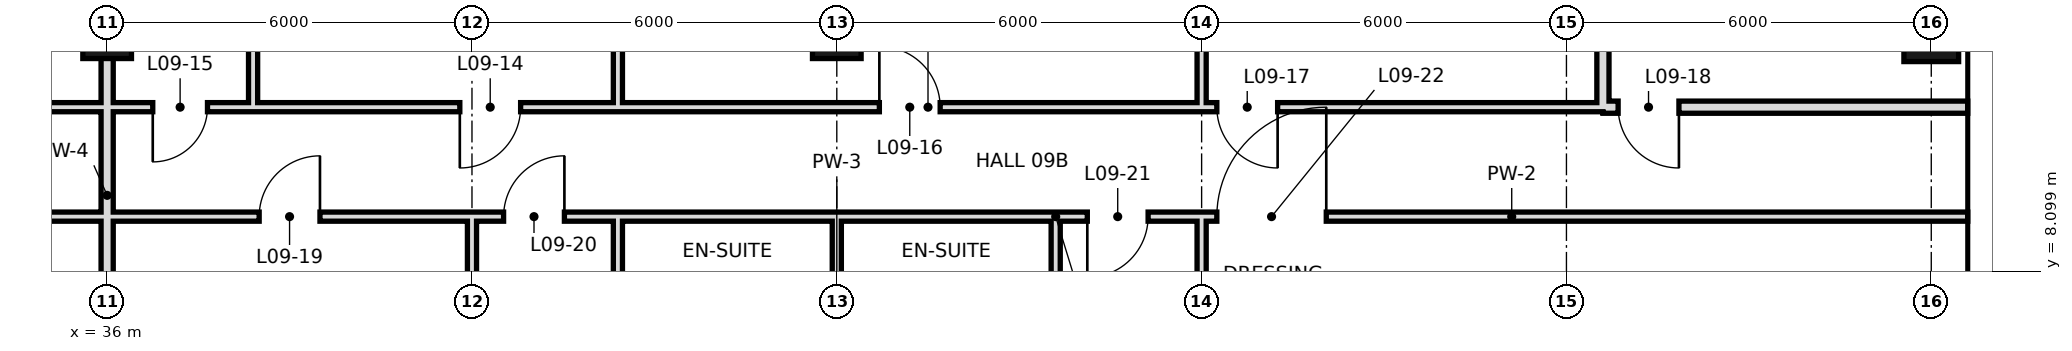
"""IFC4 building model, lengths in metres.
Left out: names, types, materials, properties, quantities, classifications, styles, units other than length and angle.
Written with IfcOpenShell. Run it as: python <this file> out.ifc"""

import sys

from ifc_helpers import new_model, si_unit, direction, frame, frame_2d, origin, origin_2d, place, context, subcontext, project, spatial, rectangle, hollow_rectangle, extrude, element, fill, save


model = new_model("IFC4")
c1 = context("Model", 3, precision=1e-05, world=origin(), true_north=direction((0.0, 1.0)))
c2 = subcontext(c1, "Body", "Model", "MODEL_VIEW")
j1 = project(units=[si_unit("LENGTHUNIT", "METRE"), si_unit("PLANEANGLEUNIT", "RADIAN")], contexts=[c1])
p1 = place(None, origin())
s1 = spatial("IfcSite", under=j1, at=p1, CompositionType="ELEMENT")
p2 = place(p1, origin())
s2 = spatial("IfcBuilding", under=s1, at=p2, CompositionType="ELEMENT")
p3 = place(p2, frame((0.0, 0.0, 53.4)))
s3 = spatial("IfcBuildingStorey", under=s2, at=p3, CompositionType="ELEMENT", Elevation=53.4)
for number, where, z_axis, x_axis in (
    (1, (36.0, 12.0, 0.0), (0.0, 0.0, 1.0), (1.0, 0.0, 0.0)),
    (2, (48.0, 12.0, 0.0), (0.0, 0.0, 1.0), (1.0, 0.0, 0.0)),
):
    element("IfcColumn", number, at=place(p3, frame(where, z_axis=z_axis, x_axis=x_axis)), inside=s3, PredefinedType="COLUMN", context=c2, shape_type="SweptSolid", body=[
        extrude(hollow_rectangle(XDim=0.8, YDim=0.8, WallThickness=0.04, at=origin_2d()), origin(), (0.0, 0.0, 1.0), 3.6),
    ])
p4 = place(p3, frame((66.0, 12.0, 0.0), z_axis=(0.0, 0.0, 1.0), x_axis=(1.0, 0.0, 0.0)))
e3 = element("IfcColumn", 3, at=p4, inside=s3, PredefinedType="COLUMN", context=c2, shape_type="SweptSolid", body=[
    extrude(hollow_rectangle(XDim=0.9, YDim=0.9, WallThickness=0.045, at=origin_2d()), origin(), (0.0, 0.0, 1.0), 3.6),
])
p5 = place(p3, frame((36.0, 0.0, 0.0), z_axis=(0.0, 0.0, 1.0), x_axis=(0.0, 1.0, 0.0)))
e4 = element("IfcWall", 4, at=p5, inside=s3, PredefinedType="SOLIDWALL", context=c2, shape_type="SweptSolid", body=[
    extrude(rectangle(XDim=18.7, YDim=0.2, at=frame_2d((9.35, 0.0))), origin(), (0.0, 0.0, 1.0), 2.72),
])
p6 = place(p3, frame((38.4, 10.8, 0.0), z_axis=(0.0, 0.0, 1.0), x_axis=(0.0, 1.0, 0.0)))
e5 = element("IfcWall", 5, at=p6, inside=s3, PredefinedType="PARTITIONING", context=c2, shape_type="SweptSolid", body=[
    extrude(rectangle(XDim=7.9, YDim=0.15, at=frame_2d((3.95, 0.0))), origin(), (0.0, 0.0, 1.0), 3.42),
])
p7 = place(p3, frame((42.0, -0.6, 0.0), z_axis=(0.0, 0.0, 1.0), x_axis=(0.0, 1.0, 0.0)))
e6 = element("IfcWall", 6, at=p7, inside=s3, PredefinedType="PARTITIONING", context=c2, shape_type="SweptSolid", body=[
    extrude(rectangle(XDim=9.6, YDim=0.15, at=frame_2d((4.8, 0.0))), origin(), (0.0, 0.0, 1.0), 2.72),
])
p8 = place(p3, frame((44.4, 10.8, 0.0), z_axis=(0.0, 0.0, 1.0), x_axis=(0.0, 1.0, 0.0)))
e7 = element("IfcWall", 7, at=p8, inside=s3, PredefinedType="PARTITIONING", context=c2, shape_type="SweptSolid", body=[
    extrude(rectangle(XDim=7.9, YDim=0.15, at=frame_2d((3.95, 0.0))), origin(), (0.0, 0.0, 1.0), 3.42),
])
p9 = place(p3, frame((44.4, 6.0, 0.0), z_axis=(0.0, 0.0, 1.0), x_axis=(0.0, 1.0, 0.0)))
e8 = element("IfcWall", 8, at=p9, inside=s3, PredefinedType="PARTITIONING", context=c2, shape_type="SweptSolid", body=[
    extrude(rectangle(XDim=3.0, YDim=0.15, at=frame_2d((1.5, 0.0))), origin(), (0.0, 0.0, 1.0), 3.42),
])
p10 = place(p3, frame((48.0, 6.0, 0.0), z_axis=(0.0, 0.0, 1.0), x_axis=(0.0, 1.0, 0.0)))
e9 = element("IfcWall", 9, at=p10, inside=s3, PredefinedType="PARTITIONING", context=c2, shape_type="SweptSolid", body=[
    extrude(rectangle(XDim=3.0, YDim=0.15, at=frame_2d((1.5, 0.0))), origin(), (0.0, 0.0, 1.0), 2.72),
])
p11 = place(p3, frame((51.6, 6.0, 0.0), z_axis=(0.0, 0.0, 1.0), x_axis=(0.0, 1.0, 0.0)))
e10 = element("IfcWall", 10, at=p11, inside=s3, PredefinedType="PARTITIONING", context=c2, shape_type="SweptSolid", body=[
    extrude(rectangle(XDim=3.0, YDim=0.15, at=frame_2d((1.5, 0.0))), origin(), (0.0, 0.0, 1.0), 3.42),
])
p12 = place(p3, frame((54.0, -0.6, 0.0), z_axis=(0.0, 0.0, 1.0), x_axis=(0.0, 1.0, 0.0)))
e11 = element("IfcWall", 11, at=p12, inside=s3, PredefinedType="PARTITIONING", context=c2, shape_type="SweptSolid", body=[
    extrude(rectangle(XDim=9.6, YDim=0.15, at=frame_2d((4.8, 0.0))), origin(), (0.0, 0.0, 1.0), 3.42),
])
p13 = place(p3, frame((54.0, 10.8, 0.0), z_axis=(0.0, 0.0, 1.0), x_axis=(0.0, 1.0, 0.0)))
e12 = element("IfcWall", 12, at=p13, inside=s3, PredefinedType="PARTITIONING", context=c2, shape_type="SweptSolid", body=[
    extrude(rectangle(XDim=7.2, YDim=0.15, at=frame_2d((3.6, 0.0))), origin(), (0.0, 0.0, 1.0), 3.42),
])
p14 = place(p3, frame((60.6, 10.8, 0.0), z_axis=(0.0, 0.0, 1.0), x_axis=(0.0, 1.0, 0.0)))
e13 = element("IfcWall", 13, at=p14, inside=s3, PredefinedType="SOLIDWALL", context=c2, shape_type="SweptSolid", body=[
    extrude(rectangle(XDim=7.2, YDim=0.2, at=frame_2d((3.6, 0.0))), origin(), (0.0, 0.0, 1.0), 2.52),
])
p15 = place(p3, frame((60.6, 10.8, 0.0), z_axis=(0.0, 0.0, 1.0), x_axis=(1.0, 0.0, 0.0)))
e14 = element("IfcWall", 14, at=p15, inside=s3, PredefinedType="SOLIDWALL", context=c2, shape_type="SweptSolid", body=[
    extrude(rectangle(XDim=6.0, YDim=0.2, at=frame_2d((3.0, 0.0))), origin(), (0.0, 0.0, 1.0), 2.97),
])
p16 = place(p15, frame((0.25, 0.0, 0.0)))
e15 = element("IfcOpeningElement", 15, at=p16, cuts=e14, PredefinedType="OPENING", context=c2, shape_type="SweptSolid", body=[
    extrude(rectangle(XDim=1.0, YDim=2.4, at=frame_2d((0.5, 1.2))), frame((0.0, 0.11, 0.0), z_axis=(0.0, -1.0, 0.0), x_axis=(1.0, 0.0, 0.0)), (0.0, 0.0, 1.0), 0.22),
])
p17 = place(p3, frame((6.6, 10.8, 0.0), z_axis=(0.0, 0.0, 1.0), x_axis=(1.0, 0.0, 0.0)))
e16 = element("IfcWall", 16, at=p17, inside=s3, PredefinedType="PARTITIONING", context=c2, shape_type="SweptSolid", body=[
    extrude(rectangle(XDim=29.4, YDim=0.15, at=frame_2d((14.7, 0.0))), origin(), (0.0, 0.0, 1.0), 3.42),
])
p18 = place(p17, frame((26.8, 0.0, 0.0)))
e17 = element("IfcOpeningElement", 17, at=p18, cuts=e16, PredefinedType="OPENING", context=c2, shape_type="SweptSolid", body=[
    extrude(rectangle(XDim=1.0, YDim=2.4, at=frame_2d((0.5, 1.2))), frame((0.0, 0.085, 0.0), z_axis=(0.0, -1.0, 0.0), x_axis=(1.0, 0.0, 0.0)), (0.0, 0.0, 1.0), 0.17),
])
p19 = place(p17, frame((3.22, 0.0, 0.0)))
e18 = element("IfcOpeningElement", 18, at=p19, cuts=e16, PredefinedType="OPENING", context=c2, shape_type="SweptSolid", body=[
    extrude(rectangle(XDim=1.0, YDim=2.4, at=frame_2d((0.5, 1.2))), frame((0.0, 0.085, 0.0), z_axis=(0.0, -1.0, 0.0), x_axis=(1.0, 0.0, 0.0)), (0.0, 0.0, 1.0), 0.17),
])
p20 = place(p17, frame((14.8, 0.0, 0.0)))
e19 = element("IfcOpeningElement", 19, at=p20, cuts=e16, PredefinedType="OPENING", context=c2, shape_type="SweptSolid", body=[
    extrude(rectangle(XDim=1.0, YDim=2.4, at=frame_2d((0.5, 1.2))), frame((0.0, 0.085, 0.0), z_axis=(0.0, -1.0, 0.0), x_axis=(1.0, 0.0, 0.0)), (0.0, 0.0, 1.0), 0.17),
])
p21 = place(p3, frame((38.4, 10.8, 0.0), z_axis=(0.0, 0.0, 1.0), x_axis=(1.0, 0.0, 0.0)))
e20 = element("IfcWall", 20, at=p21, inside=s3, PredefinedType="PARTITIONING", context=c2, shape_type="SweptSolid", body=[
    extrude(rectangle(XDim=22.2, YDim=0.15, at=frame_2d((11.1, 0.0))), origin(), (0.0, 0.0, 1.0), 3.42),
])
p22 = place(p21, frame((3.4, 0.0, 0.0)))
e21 = element("IfcOpeningElement", 21, at=p22, cuts=e20, PredefinedType="OPENING", context=c2, shape_type="SweptSolid", body=[
    extrude(rectangle(XDim=1.0, YDim=2.4, at=frame_2d((0.5, 1.2))), frame((0.0, 0.085, 0.0), z_axis=(0.0, -1.0, 0.0), x_axis=(1.0, 0.0, 0.0)), (0.0, 0.0, 1.0), 0.17),
])
p23 = place(p21, frame((10.3, 0.0, 0.0)))
e22 = element("IfcOpeningElement", 22, at=p23, cuts=e20, PredefinedType="OPENING", context=c2, shape_type="SweptSolid", body=[
    extrude(rectangle(XDim=1.0, YDim=2.4, at=frame_2d((0.5, 1.2))), frame((0.0, 0.085, 0.0), z_axis=(0.0, -1.0, 0.0), x_axis=(1.0, 0.0, 0.0)), (0.0, 0.0, 1.0), 0.17),
])
p24 = place(p21, frame((15.85, 0.0, 0.0)))
e23 = element("IfcOpeningElement", 23, at=p24, cuts=e20, PredefinedType="OPENING", context=c2, shape_type="SweptSolid", body=[
    extrude(rectangle(XDim=1.0, YDim=2.4, at=frame_2d((0.5, 1.2))), frame((0.0, 0.085, 0.0), z_axis=(0.0, -1.0, 0.0), x_axis=(1.0, 0.0, 0.0)), (0.0, 0.0, 1.0), 0.17),
])
p25 = place(p3, frame((36.0, 10.8, 0.0), z_axis=(0.0, 0.0, 1.0), x_axis=(1.0, 0.0, 0.0)))
e24 = element("IfcWall", 24, at=p25, inside=s3, PredefinedType="PARTITIONING", context=c2, shape_type="SweptSolid", body=[
    extrude(rectangle(XDim=2.4, YDim=0.15, at=frame_2d((1.2, 0.0))), origin(), (0.0, 0.0, 1.0), 3.42),
])
p26 = place(p25, frame((0.75, 0.0, 0.0)))
e25 = element("IfcOpeningElement", 25, at=p26, cuts=e24, PredefinedType="OPENING", context=c2, shape_type="SweptSolid", body=[
    extrude(rectangle(XDim=0.9, YDim=2.4, at=frame_2d((0.45, 1.2))), frame((0.0, 0.085, 0.0), z_axis=(0.0, -1.0, 0.0), x_axis=(1.0, 0.0, 0.0)), (0.0, 0.0, 1.0), 0.17),
])
p27 = place(p3, frame((8.4, 9.0, 0.0), z_axis=(0.0, 0.0, 1.0), x_axis=(1.0, 0.0, 0.0)))
e26 = element("IfcWall", 26, at=p27, inside=s3, PredefinedType="PARTITIONING", context=c2, shape_type="SweptSolid", body=[
    extrude(rectangle(XDim=36.0, YDim=0.15, at=frame_2d((18.0, 0.0))), origin(), (0.0, 0.0, 1.0), 3.42),
])
p28 = place(p27, frame((0.88, 0.0, 0.0)))
e27 = element("IfcOpeningElement", 27, at=p28, cuts=e26, PredefinedType="OPENING", context=c2, shape_type="SweptSolid", body=[
    extrude(rectangle(XDim=1.0, YDim=2.4, at=frame_2d((0.5, 1.2))), frame((0.0, 0.085, 0.0), z_axis=(0.0, -1.0, 0.0), x_axis=(1.0, 0.0, 0.0)), (0.0, 0.0, 1.0), 0.17),
])
p29 = place(p27, frame((6.1, 0.0, 0.0)))
e28 = element("IfcOpeningElement", 28, at=p29, cuts=e26, PredefinedType="OPENING", context=c2, shape_type="SweptSolid", body=[
    extrude(rectangle(XDim=1.0, YDim=2.4, at=frame_2d((0.5, 1.2))), frame((0.0, 0.085, 0.0), z_axis=(0.0, -1.0, 0.0), x_axis=(1.0, 0.0, 0.0)), (0.0, 0.0, 1.0), 0.17),
])
p30 = place(p27, frame((16.64, 0.0, 0.0)))
e29 = element("IfcOpeningElement", 29, at=p30, cuts=e26, PredefinedType="OPENING", context=c2, shape_type="SweptSolid", body=[
    extrude(rectangle(XDim=1.8, YDim=2.4, at=frame_2d((0.9, 1.2))), frame((0.0, 0.085, 0.0), z_axis=(0.0, -1.0, 0.0), x_axis=(1.0, 0.0, 0.0)), (0.0, 0.0, 1.0), 0.17),
])
p31 = place(p27, frame((23.7, 0.0, 0.0)))
e30 = element("IfcOpeningElement", 30, at=p31, cuts=e26, PredefinedType="OPENING", context=c2, shape_type="SweptSolid", body=[
    extrude(rectangle(XDim=1.8, YDim=2.4, at=frame_2d((0.9, 1.2))), frame((0.0, 0.085, 0.0), z_axis=(0.0, -1.0, 0.0), x_axis=(1.0, 0.0, 0.0)), (0.0, 0.0, 1.0), 0.17),
])
p32 = place(p27, frame((30.1, 0.0, 0.0)))
e31 = element("IfcOpeningElement", 31, at=p32, cuts=e26, PredefinedType="OPENING", context=c2, shape_type="SweptSolid", body=[
    extrude(rectangle(XDim=1.0, YDim=2.4, at=frame_2d((0.5, 1.2))), frame((0.0, 0.085, 0.0), z_axis=(0.0, -1.0, 0.0), x_axis=(1.0, 0.0, 0.0)), (0.0, 0.0, 1.0), 0.17),
])
p33 = place(p27, frame((34.12, 0.0, 0.0)))
e32 = element("IfcOpeningElement", 32, at=p33, cuts=e26, PredefinedType="OPENING", context=c2, shape_type="SweptSolid", body=[
    extrude(rectangle(XDim=1.0, YDim=2.4, at=frame_2d((0.5, 1.2))), frame((0.0, 0.085, 0.0), z_axis=(0.0, -1.0, 0.0), x_axis=(1.0, 0.0, 0.0)), (0.0, 0.0, 1.0), 0.17),
])
p34 = place(p3, frame((51.6, 9.0, 0.0), z_axis=(0.0, 0.0, 1.0), x_axis=(1.0, 0.0, 0.0)))
e33 = element("IfcWall", 33, at=p34, inside=s3, PredefinedType="PARTITIONING", context=c2, shape_type="SweptSolid", body=[
    extrude(rectangle(XDim=15.0, YDim=0.15, at=frame_2d((7.5, 0.0))), origin(), (0.0, 0.0, 1.0), 3.42),
])
p35 = place(p34, frame((0.52, 0.0, 0.0)))
e34 = element("IfcOpeningElement", 34, at=p35, cuts=e33, PredefinedType="OPENING", context=c2, shape_type="SweptSolid", body=[
    extrude(rectangle(XDim=1.0, YDim=2.4, at=frame_2d((0.5, 1.2))), frame((0.0, 0.085, 0.0), z_axis=(0.0, -1.0, 0.0), x_axis=(1.0, 0.0, 0.0)), (0.0, 0.0, 1.0), 0.17),
])
p36 = place(p34, frame((2.65, 0.0, 0.0)))
e35 = element("IfcOpeningElement", 35, at=p36, cuts=e33, PredefinedType="OPENING", context=c2, shape_type="SweptSolid", body=[
    extrude(rectangle(XDim=1.8, YDim=2.4, at=frame_2d((0.9, 1.2))), frame((0.0, 0.085, 0.0), z_axis=(0.0, -1.0, 0.0), x_axis=(1.0, 0.0, 0.0)), (0.0, 0.0, 1.0), 0.17),
])
p37 = place(p3, frame((44.4, 9.0, 0.0), z_axis=(0.0, 0.0, 1.0), x_axis=(1.0, 0.0, 0.0)))
e36 = element("IfcWall", 36, at=p37, inside=s3, PredefinedType="PARTITIONING", context=c2, shape_type="SweptSolid", body=[
    extrude(rectangle(XDim=7.2, YDim=0.15, at=frame_2d((3.6, 0.0))), origin(), (0.0, 0.0, 1.0), 3.42),
])
p38 = place(p22, frame((1.0, 0.0, 0.0), z_axis=(0.0, 0.0, 1.0), x_axis=(-1.0, 0.0, 0.0)))
e37 = element("IfcDoor", 37, at=p38, inside=s3, OperationType="SINGLE_SWING_RIGHT", PredefinedType="DOOR", context=c2, shape_type="SweptSolid", body=[
    extrude(rectangle(XDim=1.0, YDim=2.4, at=frame_2d((0.5, 1.2))), frame((0.0, 0.025, 0.0), z_axis=(0.0, -1.0, 0.0), x_axis=(1.0, 0.0, 0.0)), (0.0, 0.0, 1.0), 0.05),
])
fill(e21, e37)
p39 = place(p26, frame((0.9, 0.0, 0.0), z_axis=(0.0, 0.0, 1.0), x_axis=(-1.0, 0.0, 0.0)))
e38 = element("IfcDoor", 38, at=p39, inside=s3, OperationType="SINGLE_SWING_RIGHT", PredefinedType="DOOR", context=c2, shape_type="SweptSolid", body=[
    extrude(rectangle(XDim=0.9, YDim=2.4, at=frame_2d((0.45, 1.2))), frame((0.0, 0.025, 0.0), z_axis=(0.0, -1.0, 0.0), x_axis=(1.0, 0.0, 0.0)), (0.0, 0.0, 1.0), 0.05),
])
fill(e25, e38)
p40 = place(p23, origin())
e39 = element("IfcDoor", 39, at=p40, inside=s3, OperationType="SINGLE_SWING_LEFT", PredefinedType="DOOR", context=c2, shape_type="SweptSolid", body=[
    extrude(rectangle(XDim=1.0, YDim=2.4, at=frame_2d((0.5, 1.2))), frame((0.0, 0.025, 0.0), z_axis=(0.0, -1.0, 0.0), x_axis=(1.0, 0.0, 0.0)), (0.0, 0.0, 1.0), 0.05),
])
fill(e22, e39)
p41 = place(p24, origin())
e40 = element("IfcDoor", 40, at=p41, inside=s3, OperationType="SINGLE_SWING_RIGHT", PredefinedType="DOOR", context=c2, shape_type="SweptSolid", body=[
    extrude(rectangle(XDim=1.0, YDim=2.4, at=frame_2d((0.5, 1.2))), frame((0.0, 0.025, 0.0), z_axis=(0.0, -1.0, 0.0), x_axis=(1.0, 0.0, 0.0)), (0.0, 0.0, 1.0), 0.05),
])
fill(e23, e40)
p42 = place(p16, origin())
e41 = element("IfcDoor", 41, at=p42, inside=s3, OperationType="SINGLE_SWING_RIGHT", PredefinedType="DOOR", context=c2, shape_type="SweptSolid", body=[
    extrude(rectangle(XDim=1.0, YDim=2.4, at=frame_2d((0.5, 1.2))), frame((0.0, 0.025, 0.0), z_axis=(0.0, -1.0, 0.0), x_axis=(1.0, 0.0, 0.0)), (0.0, 0.0, 1.0), 0.05),
])
fill(e15, e41)
p43 = place(p32, frame((1.0, 0.0, 0.0), z_axis=(0.0, 0.0, 1.0), x_axis=(-1.0, 0.0, 0.0)))
e42 = element("IfcDoor", 42, at=p43, inside=s3, OperationType="SINGLE_SWING_LEFT", PredefinedType="DOOR", context=c2, shape_type="SweptSolid", body=[
    extrude(rectangle(XDim=1.0, YDim=2.4, at=frame_2d((0.5, 1.2))), frame((0.0, 0.025, 0.0), z_axis=(0.0, -1.0, 0.0), x_axis=(1.0, 0.0, 0.0)), (0.0, 0.0, 1.0), 0.05),
])
fill(e31, e42)
p44 = place(p33, frame((1.0, 0.0, 0.0), z_axis=(0.0, 0.0, 1.0), x_axis=(-1.0, 0.0, 0.0)))
e43 = element("IfcDoor", 43, at=p44, inside=s3, OperationType="SINGLE_SWING_LEFT", PredefinedType="DOOR", context=c2, shape_type="SweptSolid", body=[
    extrude(rectangle(XDim=1.0, YDim=2.4, at=frame_2d((0.5, 1.2))), frame((0.0, 0.025, 0.0), z_axis=(0.0, -1.0, 0.0), x_axis=(1.0, 0.0, 0.0)), (0.0, 0.0, 1.0), 0.05),
])
fill(e32, e43)
p45 = place(p35, frame((1.0, 0.0, 0.0), z_axis=(0.0, 0.0, 1.0), x_axis=(-1.0, 0.0, 0.0)))
e44 = element("IfcDoor", 44, at=p45, inside=s3, OperationType="SINGLE_SWING_RIGHT", PredefinedType="DOOR", context=c2, shape_type="SweptSolid", body=[
    extrude(rectangle(XDim=1.0, YDim=2.4, at=frame_2d((0.5, 1.2))), frame((0.0, 0.025, 0.0), z_axis=(0.0, -1.0, 0.0), x_axis=(1.0, 0.0, 0.0)), (0.0, 0.0, 1.0), 0.05),
])
fill(e34, e44)
p46 = place(p36, frame((1.8, 0.0, 0.0), z_axis=(0.0, 0.0, 1.0), x_axis=(-1.0, 0.0, 0.0)))
e45 = element("IfcDoor", 45, at=p46, inside=s3, OperationType="SINGLE_SWING_LEFT", PredefinedType="DOOR", context=c2, shape_type="SweptSolid", body=[
    extrude(rectangle(XDim=1.8, YDim=2.4, at=frame_2d((0.9, 1.2))), frame((0.0, 0.025, 0.0), z_axis=(0.0, -1.0, 0.0), x_axis=(1.0, 0.0, 0.0)), (0.0, 0.0, 1.0), 0.05),
])
fill(e35, e45)
save(model, sys.argv[1])
